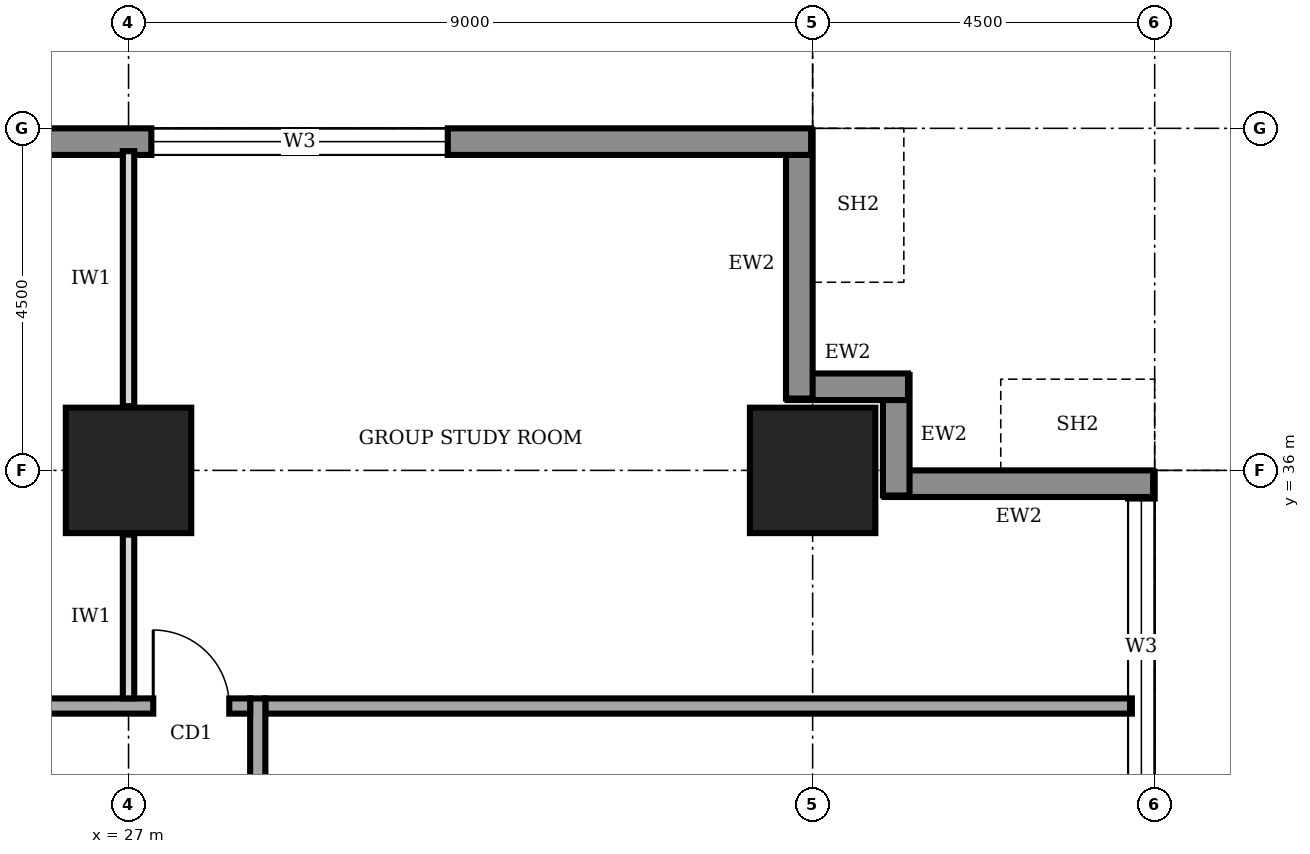
"""IFC4 building model, lengths in metres.
Left out: names, types, materials, properties, quantities, classifications, styles, units other than length and angle.
Written with IfcOpenShell. Run it as: python <this file> out.ifc"""

import sys

from ifc_helpers import new_model, si_unit, direction, frame, frame_2d, origin, origin_2d, place, context, subcontext, project, spatial, rectangle, extrude, element, fill, save


model = new_model("IFC4")
c1 = context("Model", 3, precision=1e-05, world=origin(), true_north=direction((0.0, 1.0)))
c2 = subcontext(c1, "Body", "Model", "MODEL_VIEW")
j1 = project(units=[si_unit("LENGTHUNIT", "METRE"), si_unit("PLANEANGLEUNIT", "RADIAN")], contexts=[c1])
p1 = place(None, origin())
s1 = spatial("IfcSite", under=j1, at=p1, CompositionType="ELEMENT")
p2 = place(p1, origin())
s2 = spatial("IfcBuilding", under=s1, at=p2, CompositionType="ELEMENT")
p3 = place(p2, frame((0.0, 0.0, 193.0)))
s3 = spatial("IfcBuildingStorey", under=s2, at=p3, CompositionType="ELEMENT", Elevation=193.0)
for number, where, z_axis, x_axis in (
    (1, (27.0, 36.0, 0.0), (0.0, 0.0, 1.0), (1.0, 0.0, 0.0)),
    (2, (36.0, 36.0, 0.0), (0.0, 0.0, 1.0), (1.0, 0.0, 0.0)),
):
    element("IfcColumn", number, at=place(p3, frame(where, z_axis=z_axis, x_axis=x_axis)), inside=s3, PredefinedType="COLUMN", context=c2, shape_type="SweptSolid", body=[
        extrude(rectangle(XDim=1.65, YDim=1.65, at=origin_2d()), origin(), (0.0, 0.0, 1.0), 4.0),
    ])
p4 = place(p3, frame((40.325, 4.52, 0.0), z_axis=(0.0, 0.0, 1.0), x_axis=(0.0, 1.0, 0.0)))
e3 = element("IfcWall", 3, at=p4, inside=s3, PredefinedType="STANDARD", context=c2, shape_type="SweptSolid", body=[
    extrude(rectangle(XDim=31.46, YDim=0.35, at=frame_2d((15.73, 0.0))), origin(), (0.0, 0.0, 1.0), 3.75),
])
p5 = place(p4, frame((4.78, 0.0, 0.95)))
e4 = element("IfcOpeningElement", 4, at=p5, cuts=e3, PredefinedType="OPENING", context=c2, shape_type="SweptSolid", body=[
    extrude(rectangle(XDim=3.9, YDim=1.8, at=frame_2d((1.95, 0.9))), frame((0.0, 0.185, 0.0), z_axis=(0.0, -1.0, 0.0), x_axis=(1.0, 0.0, 0.0)), (0.0, 0.0, 1.0), 0.37),
])
p6 = place(p4, frame((9.28, 0.0, 0.95)))
e5 = element("IfcOpeningElement", 5, at=p6, cuts=e3, PredefinedType="OPENING", context=c2, shape_type="SweptSolid", body=[
    extrude(rectangle(XDim=3.9, YDim=1.8, at=frame_2d((1.95, 0.9))), frame((0.0, 0.185, 0.0), z_axis=(0.0, -1.0, 0.0), x_axis=(1.0, 0.0, 0.0)), (0.0, 0.0, 1.0), 0.37),
])
p7 = place(p4, frame((13.78, 0.0, 0.95)))
e6 = element("IfcOpeningElement", 6, at=p7, cuts=e3, PredefinedType="OPENING", context=c2, shape_type="SweptSolid", body=[
    extrude(rectangle(XDim=3.9, YDim=1.8, at=frame_2d((1.95, 0.9))), frame((0.0, 0.185, 0.0), z_axis=(0.0, -1.0, 0.0), x_axis=(1.0, 0.0, 0.0)), (0.0, 0.0, 1.0), 0.37),
])
p8 = place(p4, frame((18.28, 0.0, 0.95)))
e7 = element("IfcOpeningElement", 7, at=p8, cuts=e3, PredefinedType="OPENING", context=c2, shape_type="SweptSolid", body=[
    extrude(rectangle(XDim=3.9, YDim=1.8, at=frame_2d((1.95, 0.9))), frame((0.0, 0.185, 0.0), z_axis=(0.0, -1.0, 0.0), x_axis=(1.0, 0.0, 0.0)), (0.0, 0.0, 1.0), 0.37),
])
p9 = place(p4, frame((22.78, 0.0, 0.95)))
e8 = element("IfcOpeningElement", 8, at=p9, cuts=e3, PredefinedType="OPENING", context=c2, shape_type="SweptSolid", body=[
    extrude(rectangle(XDim=3.9, YDim=1.8, at=frame_2d((1.95, 0.9))), frame((0.0, 0.185, 0.0), z_axis=(0.0, -1.0, 0.0), x_axis=(1.0, 0.0, 0.0)), (0.0, 0.0, 1.0), 0.37),
])
p10 = place(p4, frame((27.21, 0.0, 0.95)))
e9 = element("IfcOpeningElement", 9, at=p10, cuts=e3, PredefinedType="OPENING", context=c2, shape_type="SweptSolid", body=[
    extrude(rectangle(XDim=3.9, YDim=1.8, at=frame_2d((1.95, 0.9))), frame((0.0, 0.185, 0.0), z_axis=(0.0, -1.0, 0.0), x_axis=(1.0, 0.0, 0.0)), (0.0, 0.0, 1.0), 0.37),
])
p11 = place(p3, frame((40.48, 35.825, 0.0), z_axis=(0.0, 0.0, 1.0), x_axis=(-1.0, 0.0, 0.0)))
e10 = element("IfcWall", 10, at=p11, inside=s3, PredefinedType="STANDARD", context=c2, shape_type="SweptSolid", body=[
    extrude(rectangle(XDim=3.535, YDim=0.35, at=frame_2d((1.768, 0.0))), origin(), (0.0, 0.0, 1.0), 2.85),
])
for number, where, z_axis, x_axis in (
    (11, (37.1, 35.67, 0.0), (0.0, 0.0, 1.0), (0.0, 1.0, 0.0)),
    (12, (37.255, 37.1, 0.0), (0.0, 0.0, 1.0), (-1.0, 0.0, 0.0)),
):
    element("IfcWall", number, at=place(p3, frame(where, z_axis=z_axis, x_axis=x_axis)), inside=s3, PredefinedType="STANDARD", context=c2, shape_type="SweptSolid", body=[
        extrude(rectangle(XDim=1.585, YDim=0.35, at=frame_2d((0.792, 0.0))), origin(), (0.0, 0.0, 1.0), 3.75),
    ])
p12 = place(p3, frame((35.825, 36.945, 0.0), z_axis=(0.0, 0.0, 1.0), x_axis=(0.0, 1.0, 0.0)))
e13 = element("IfcWall", 13, at=p12, inside=s3, PredefinedType="STANDARD", context=c2, shape_type="SweptSolid", body=[
    extrude(rectangle(XDim=3.535, YDim=0.35, at=frame_2d((1.768, 0.0))), origin(), (0.0, 0.0, 1.0), 2.85),
])
p13 = place(p3, frame((35.98, 40.325, 0.0), z_axis=(0.0, 0.0, 1.0), x_axis=(-1.0, 0.0, 0.0)))
e14 = element("IfcWall", 14, at=p13, inside=s3, PredefinedType="STANDARD", context=c2, shape_type="SweptSolid", body=[
    extrude(rectangle(XDim=31.46, YDim=0.35, at=frame_2d((15.73, 0.0))), origin(), (0.0, 0.0, 1.0), 3.75),
])
p14 = place(p13, frame((27.21, 0.0, 0.95)))
e15 = element("IfcOpeningElement", 15, at=p14, cuts=e14, PredefinedType="OPENING", context=c2, shape_type="SweptSolid", body=[
    extrude(rectangle(XDim=3.9, YDim=1.8, at=frame_2d((1.95, 0.9))), frame((0.0, 0.185, 0.0), z_axis=(0.0, -1.0, 0.0), x_axis=(1.0, 0.0, 0.0)), (0.0, 0.0, 1.0), 0.37),
])
p15 = place(p13, frame((22.78, 0.0, 0.95)))
e16 = element("IfcOpeningElement", 16, at=p15, cuts=e14, PredefinedType="OPENING", context=c2, shape_type="SweptSolid", body=[
    extrude(rectangle(XDim=3.9, YDim=1.8, at=frame_2d((1.95, 0.9))), frame((0.0, 0.185, 0.0), z_axis=(0.0, -1.0, 0.0), x_axis=(1.0, 0.0, 0.0)), (0.0, 0.0, 1.0), 0.37),
])
p16 = place(p13, frame((4.78, 0.0, 0.95)))
e17 = element("IfcOpeningElement", 17, at=p16, cuts=e14, PredefinedType="OPENING", context=c2, shape_type="SweptSolid", body=[
    extrude(rectangle(XDim=3.9, YDim=1.8, at=frame_2d((1.95, 0.9))), frame((0.0, 0.185, 0.0), z_axis=(0.0, -1.0, 0.0), x_axis=(1.0, 0.0, 0.0)), (0.0, 0.0, 1.0), 0.37),
])
p17 = place(p3, frame((28.7, 7.7, 0.0), z_axis=(0.0, 0.0, 1.0), x_axis=(0.0, 1.0, 0.0)))
e18 = element("IfcWall", 18, at=p17, inside=s3, PredefinedType="SOLIDWALL", context=c2, shape_type="SweptSolid", body=[
    extrude(rectangle(XDim=25.3, YDim=0.2, at=frame_2d((12.65, 0.0))), origin(), (0.0, 0.0, 1.0), 3.75),
])
p18 = place(p17, frame((4.15, 0.0, 0.0)))
e19 = element("IfcOpeningElement", 19, at=p18, cuts=e18, PredefinedType="OPENING", context=c2, shape_type="SweptSolid", body=[
    extrude(rectangle(XDim=1.8, YDim=2.1, at=frame_2d((0.9, 1.05))), frame((0.0, 0.11, 0.0), z_axis=(0.0, -1.0, 0.0), x_axis=(1.0, 0.0, 0.0)), (0.0, 0.0, 1.0), 0.22),
])
p19 = place(p17, frame((17.1, 0.0, 0.0)))
e20 = element("IfcOpeningElement", 20, at=p19, cuts=e18, PredefinedType="OPENING", context=c2, shape_type="SweptSolid", body=[
    extrude(rectangle(XDim=1.4, YDim=2.1, at=frame_2d((0.7, 1.05))), frame((0.0, 0.11, 0.0), z_axis=(0.0, -1.0, 0.0), x_axis=(1.0, 0.0, 0.0)), (0.0, 0.0, 1.0), 0.22),
])
p20 = place(p3, frame((28.6, 32.9, 0.0), z_axis=(0.0, 0.0, 1.0), x_axis=(-1.0, 0.0, 0.0)))
e21 = element("IfcWall", 21, at=p20, inside=s3, PredefinedType="SOLIDWALL", context=c2, shape_type="SweptSolid", body=[
    extrude(rectangle(XDim=16.9, YDim=0.2, at=frame_2d((8.45, 0.0))), origin(), (0.0, 0.0, 1.0), 3.75),
])
p21 = place(p20, frame((15.425, 0.0, 0.0)))
e22 = element("IfcOpeningElement", 22, at=p21, cuts=e21, PredefinedType="OPENING", context=c2, shape_type="SweptSolid", body=[
    extrude(rectangle(XDim=1.0, YDim=2.1, at=frame_2d((0.5, 1.05))), frame((0.0, 0.11, 0.0), z_axis=(0.0, -1.0, 0.0), x_axis=(1.0, 0.0, 0.0)), (0.0, 0.0, 1.0), 0.22),
])
p22 = place(p20, frame((12.35, 0.0, 0.0)))
e23 = element("IfcOpeningElement", 23, at=p22, cuts=e21, PredefinedType="OPENING", context=c2, shape_type="SweptSolid", body=[
    extrude(rectangle(XDim=1.0, YDim=2.1, at=frame_2d((0.5, 1.05))), frame((0.0, 0.11, 0.0), z_axis=(0.0, -1.0, 0.0), x_axis=(1.0, 0.0, 0.0)), (0.0, 0.0, 1.0), 0.22),
])
p23 = place(p20, frame((5.6, 0.0, 0.0)))
e24 = element("IfcOpeningElement", 24, at=p23, cuts=e21, PredefinedType="OPENING", context=c2, shape_type="SweptSolid", body=[
    extrude(rectangle(XDim=1.0, YDim=2.1, at=frame_2d((0.5, 1.05))), frame((0.0, 0.11, 0.0), z_axis=(0.0, -1.0, 0.0), x_axis=(1.0, 0.0, 0.0)), (0.0, 0.0, 1.0), 0.22),
])
p24 = place(p20, frame((0.275, 0.0, 0.0)))
e25 = element("IfcOpeningElement", 25, at=p24, cuts=e21, PredefinedType="OPENING", context=c2, shape_type="SweptSolid", body=[
    extrude(rectangle(XDim=1.0, YDim=2.1, at=frame_2d((0.5, 1.05))), frame((0.0, 0.11, 0.0), z_axis=(0.0, -1.0, 0.0), x_axis=(1.0, 0.0, 0.0)), (0.0, 0.0, 1.0), 0.22),
])
p25 = place(p3, frame((28.8, 32.9, 0.0), z_axis=(0.0, 0.0, 1.0), x_axis=(1.0, 0.0, 0.0)))
e26 = element("IfcWall", 26, at=p25, inside=s3, PredefinedType="SOLIDWALL", context=c2, shape_type="SweptSolid", body=[
    extrude(rectangle(XDim=11.4, YDim=0.2, at=frame_2d((5.7, 0.0))), origin(), (0.0, 0.0, 1.0), 3.75),
])
p26 = place(p3, frame((27.0, 33.0, 0.0), z_axis=(0.0, 0.0, 1.0), x_axis=(0.0, 1.0, 0.0)))
e27 = element("IfcWall", 27, at=p26, inside=s3, PredefinedType="PARTITIONING", context=c2, shape_type="SweptSolid", body=[
    extrude(rectangle(XDim=2.155, YDim=0.15, at=frame_2d((1.078, 0.0))), origin(), (0.0, 0.0, 1.0), 2.85),
])
p27 = place(p3, frame((27.0, 36.845, 0.0), z_axis=(0.0, 0.0, 1.0), x_axis=(0.0, 1.0, 0.0)))
e28 = element("IfcWall", 28, at=p27, inside=s3, PredefinedType="PARTITIONING", context=c2, shape_type="SweptSolid", body=[
    extrude(rectangle(XDim=3.355, YDim=0.15, at=frame_2d((1.677, 0.0))), origin(), (0.0, 0.0, 1.0), 2.85),
])
p28 = place(p10, origin())
e29 = element("IfcWindow", 29, at=p28, inside=s3, PartitioningType="SINGLE_PANEL", PredefinedType="WINDOW", context=c2, shape_type="SweptSolid", body=[
    extrude(rectangle(XDim=3.9, YDim=1.8, at=frame_2d((1.95, 0.9))), frame((0.0, 0.03, 0.0), z_axis=(0.0, -1.0, 0.0), x_axis=(1.0, 0.0, 0.0)), (0.0, 0.0, 1.0), 0.06),
])
fill(e9, e29)
p29 = place(p16, origin())
e30 = element("IfcWindow", 30, at=p29, inside=s3, PartitioningType="SINGLE_PANEL", PredefinedType="WINDOW", context=c2, shape_type="SweptSolid", body=[
    extrude(rectangle(XDim=3.9, YDim=1.8, at=frame_2d((1.95, 0.9))), frame((0.0, 0.03, 0.0), z_axis=(0.0, -1.0, 0.0), x_axis=(1.0, 0.0, 0.0)), (0.0, 0.0, 1.0), 0.06),
])
fill(e17, e30)
p30 = place(p24, frame((1.0, 0.0, 0.0), z_axis=(0.0, 0.0, 1.0), x_axis=(-1.0, 0.0, 0.0)))
e31 = element("IfcDoor", 31, at=p30, inside=s3, OperationType="SINGLE_SWING_LEFT", PredefinedType="DOOR", context=c2, shape_type="SweptSolid", body=[
    extrude(rectangle(XDim=1.0, YDim=2.1, at=frame_2d((0.5, 1.05))), frame((0.0, 0.025, 0.0), z_axis=(0.0, -1.0, 0.0), x_axis=(1.0, 0.0, 0.0)), (0.0, 0.0, 1.0), 0.05),
])
fill(e25, e31)
save(model, sys.argv[1])
